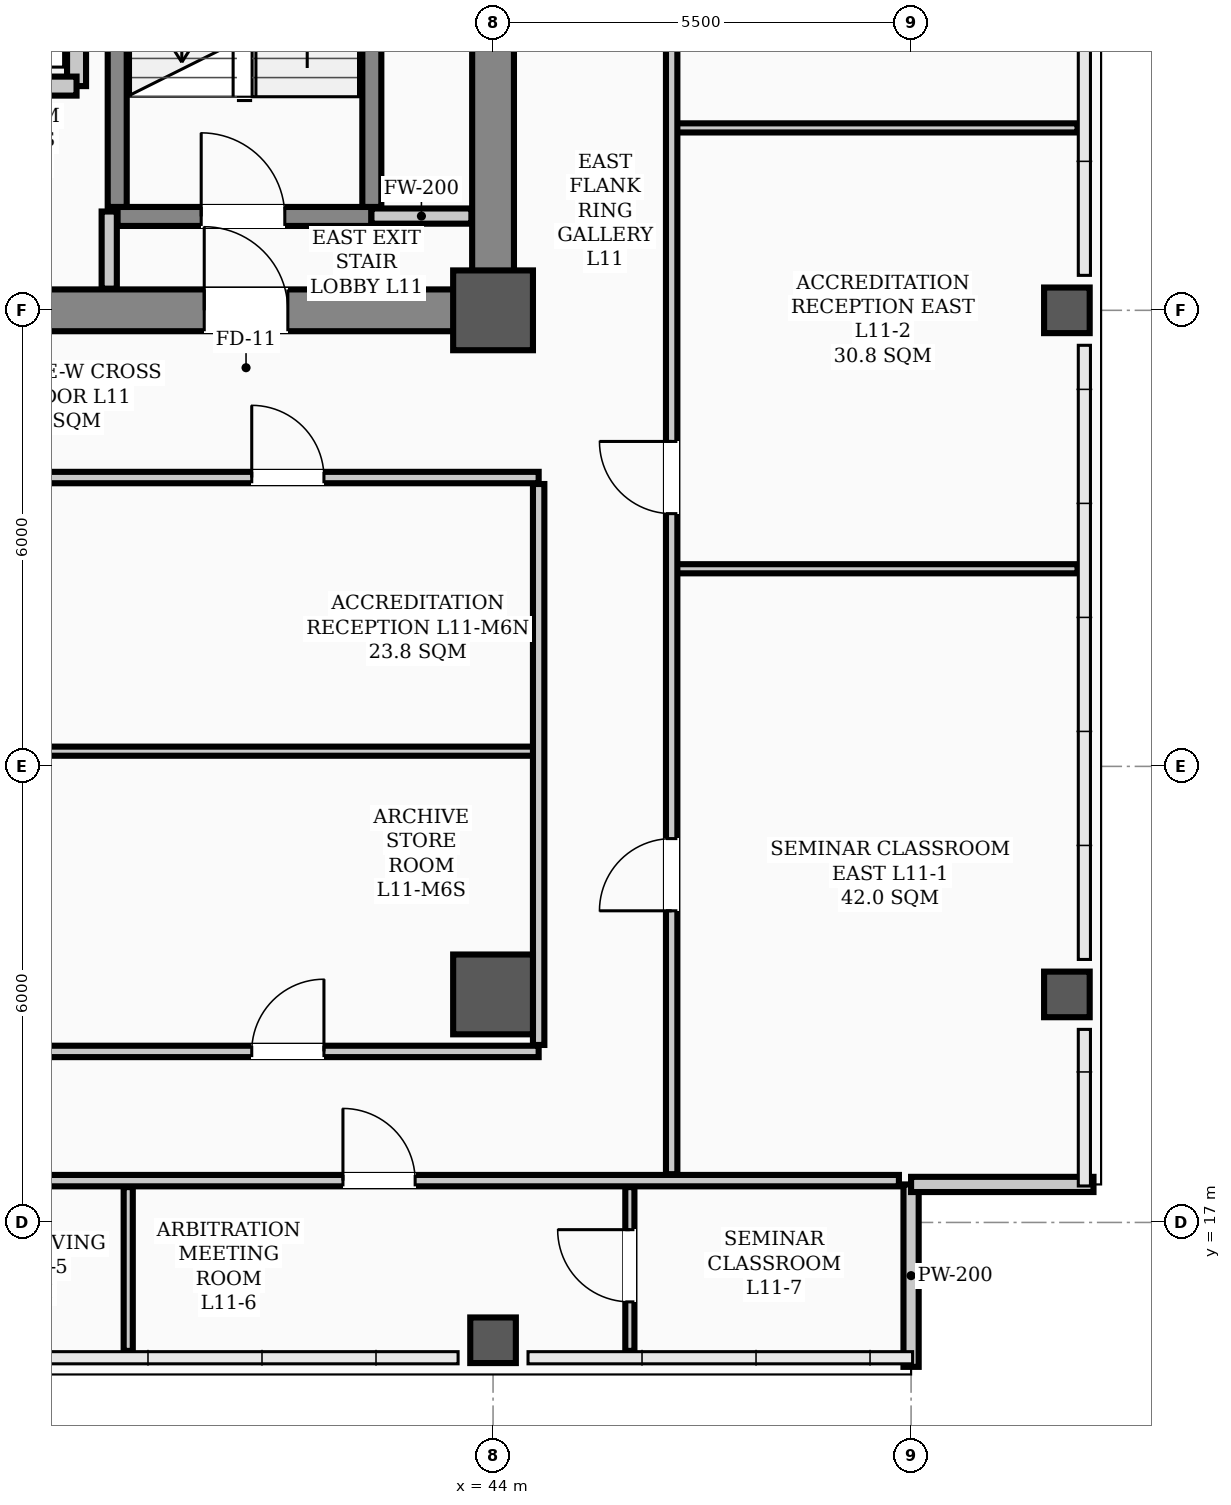
"""IFC4 building model, lengths in metres.
Left out: names, types, materials, properties, quantities, classifications, styles, units other than length and angle.
Written with IfcOpenShell. Run it as: python <this file> out.ifc"""

import sys

from ifc_helpers import new_model, si_unit, direction, frame, frame_2d, origin, origin_2d, place, context, subcontext, project, spatial, rectangle, hollow_rectangle, extrude, element, fill, save


model = new_model("IFC4")
c1 = context("Model", 3, precision=1e-05, world=origin(), true_north=direction((0.0, 1.0)))
c2 = subcontext(c1, "Body", "Model", "MODEL_VIEW")
j1 = project(units=[si_unit("LENGTHUNIT", "METRE"), si_unit("PLANEANGLEUNIT", "RADIAN")], contexts=[c1])
p1 = place(None, origin())
s1 = spatial("IfcSite", under=j1, at=p1, CompositionType="ELEMENT")
p2 = place(p1, origin())
s2 = spatial("IfcBuilding", under=s1, at=p2, CompositionType="ELEMENT")
p3 = place(p2, frame((0.0, 0.0, 46.0)))
s3 = spatial("IfcBuildingStorey", under=s2, at=p3, CompositionType="ELEMENT", Elevation=46.0)
for number, where, z_axis, x_axis in (
    (1, (44.0, 29.0, 0.0), (0.0, 0.0, 1.0), (1.0, 0.0, 0.0)),
    (2, (44.0, 20.0, 0.0), (0.0, 0.0, 1.0), (1.0, 0.0, 0.0)),
):
    element("IfcColumn", number, at=place(p3, frame(where, z_axis=z_axis, x_axis=x_axis)), inside=s3, PredefinedType="COLUMN", context=c2, shape_type="SweptSolid", body=[
        extrude(hollow_rectangle(XDim=1.05, YDim=1.05, WallThickness=0.038, InnerFilletRadius=0.019, OuterFilletRadius=0.057, at=origin_2d()), origin(), (0.0, 0.0, 1.0), 3.9),
    ])
for number, where, z_axis, x_axis in (
    (3, (44.0, 15.45, 0.0), (0.0, 0.0, 1.0), (1.0, 0.0, 0.0)),
    (4, (51.55, 20.0, 0.0), (0.0, 0.0, 1.0), (1.0, 0.0, 0.0)),
    (5, (51.55, 29.0, 0.0), (0.0, 0.0, 1.0), (1.0, 0.0, 0.0)),
):
    element("IfcColumn", number, at=place(p3, frame(where, z_axis=z_axis, x_axis=x_axis)), inside=s3, PredefinedType="COLUMN", context=c2, shape_type="SweptSolid", body=[
        extrude(hollow_rectangle(XDim=0.6, YDim=0.6, WallThickness=0.026, InnerFilletRadius=0.013, OuterFilletRadius=0.039, at=origin_2d()), origin(), (0.0, 0.0, 1.0), 3.9),
    ])
for number, where, z_axis, x_axis in (
    (6, (49.5, 15.1, 0.0), (0.0, 0.0, 1.0), (0.0, 1.0, 0.0)),
    (7, (49.5, 17.5, 0.0), (0.0, 0.0, 1.0), (1.0, 0.0, 0.0)),
):
    element("IfcWall", number, at=place(p3, frame(where, z_axis=z_axis, x_axis=x_axis)), inside=s3, PredefinedType="PARAPET", context=c2, shape_type="SweptSolid", body=[
        extrude(rectangle(XDim=2.4, YDim=0.2, at=frame_2d((1.2, 0.0))), origin(), (0.0, 0.0, 1.0), 1.2),
    ])
p4 = place(p3, frame((13.5, 29.0, 0.0), z_axis=(0.0, 0.0, 1.0), x_axis=(1.0, 0.0, 0.0)))
e8 = element("IfcWall", 8, at=p4, inside=s3, PredefinedType="SHEAR", context=c2, shape_type="SweptSolid", body=[
    extrude(rectangle(XDim=30.5, YDim=0.55, at=frame_2d((15.25, 0.0))), origin(), (0.0, 0.0, 1.0), 3.72),
])
p5 = place(p4, frame((1.75, 0.0, 0.0)))
e9 = element("IfcOpeningElement", 9, at=p5, cuts=e8, PredefinedType="OPENING", context=c2, shape_type="SweptSolid", body=[
    extrude(rectangle(XDim=1.1, YDim=2.08, at=frame_2d((0.55, 1.04))), frame((0.0, 0.285, 0.0), z_axis=(0.0, -1.0, 0.0), x_axis=(1.0, 0.0, 0.0)), (0.0, 0.0, 1.0), 0.57),
])
p6 = place(p4, frame((26.7, 0.0, 0.0)))
e10 = element("IfcOpeningElement", 10, at=p6, cuts=e8, PredefinedType="OPENING", context=c2, shape_type="SweptSolid", body=[
    extrude(rectangle(XDim=1.1, YDim=2.08, at=frame_2d((0.55, 1.04))), frame((0.0, 0.285, 0.0), z_axis=(0.0, -1.0, 0.0), x_axis=(1.0, 0.0, 0.0)), (0.0, 0.0, 1.0), 0.57),
])
p7 = place(p4, frame((6.8, 0.0, 0.0)))
e11 = element("IfcOpeningElement", 11, at=p7, cuts=e8, PredefinedType="OPENING", context=c2, shape_type="SweptSolid", body=[
    extrude(rectangle(XDim=1.1, YDim=2.08, at=frame_2d((0.55, 1.04))), frame((0.0, 0.285, 0.0), z_axis=(0.0, -1.0, 0.0), x_axis=(1.0, 0.0, 0.0)), (0.0, 0.0, 1.0), 0.57),
])
p8 = place(p4, frame((13.2, 0.0, 0.0)))
e12 = element("IfcOpeningElement", 12, at=p8, cuts=e8, PredefinedType="OPENING", context=c2, shape_type="SweptSolid", body=[
    extrude(rectangle(XDim=1.6, YDim=2.08, at=frame_2d((0.8, 1.04))), frame((0.0, 0.285, 0.0), z_axis=(0.0, -1.0, 0.0), x_axis=(1.0, 0.0, 0.0)), (0.0, 0.0, 1.0), 0.57),
])
p9 = place(p4, frame((19.6, 0.0, 0.0)))
e13 = element("IfcOpeningElement", 13, at=p9, cuts=e8, PredefinedType="OPENING", context=c2, shape_type="SweptSolid", body=[
    extrude(rectangle(XDim=0.9, YDim=2.08, at=frame_2d((0.45, 1.04))), frame((0.0, 0.285, 0.0), z_axis=(0.0, -1.0, 0.0), x_axis=(1.0, 0.0, 0.0)), (0.0, 0.0, 1.0), 0.57),
])
p10 = place(p4, frame((21.6, 0.0, 0.0)))
e14 = element("IfcOpeningElement", 14, at=p10, cuts=e8, PredefinedType="OPENING", context=c2, shape_type="SweptSolid", body=[
    extrude(rectangle(XDim=0.9, YDim=2.08, at=frame_2d((0.45, 1.04))), frame((0.0, 0.285, 0.0), z_axis=(0.0, -1.0, 0.0), x_axis=(1.0, 0.0, 0.0)), (0.0, 0.0, 1.0), 0.57),
])
p11 = place(p3, frame((44.0, 29.35, 0.0), z_axis=(0.0, 0.0, 1.0), x_axis=(0.0, 1.0, 0.0)))
e15 = element("IfcWall", 15, at=p11, inside=s3, PredefinedType="SHEAR", context=c2, shape_type="SweptSolid", body=[
    extrude(rectangle(XDim=8.6, YDim=0.55, at=frame_2d((4.3, 0.0))), origin(), (0.0, 0.0, 1.0), 3.72),
])
p12 = place(p3, frame((39.06, 30.235, 0.0), z_axis=(0.0, 0.0, 1.0), x_axis=(1.0, 0.0, 0.0)))
e16 = element("IfcWall", 16, at=p12, inside=s3, PredefinedType="STANDARD", context=c2, shape_type="SweptSolid", body=[
    extrude(rectangle(XDim=3.34, YDim=0.25, at=frame_2d((1.67, 0.0))), origin(), (0.0, 0.0, 1.0), 3.72),
])
p13 = place(p12, frame((1.1, 0.0, 0.0)))
e17 = element("IfcOpeningElement", 17, at=p13, cuts=e16, PredefinedType="OPENING", context=c2, shape_type="SweptSolid", body=[
    extrude(rectangle(XDim=1.1, YDim=2.08, at=frame_2d((0.55, 1.04))), frame((0.0, 0.135, 0.0), z_axis=(0.0, -1.0, 0.0), x_axis=(1.0, 0.0, 0.0)), (0.0, 0.0, 1.0), 0.27),
])
for number, where, z_axis, x_axis in (
    (18, (39.055, 30.36, 0.0), (0.0, 0.0, 1.0), (0.0, 1.0, 0.0)),
    (19, (42.405, 30.36, 0.0), (0.0, 0.0, 1.0), (0.0, 1.0, 0.0)),
):
    element("IfcWall", number, at=place(p3, frame(where, z_axis=z_axis, x_axis=x_axis)), inside=s3, PredefinedType="STANDARD", context=c2, shape_type="SweptSolid", body=[
        extrude(rectangle(XDim=7.184, YDim=0.25, at=frame_2d((3.592, 0.0))), origin(), (0.0, 0.0, 1.0), 3.72),
    ])
p14 = place(p3, frame((38.52, 31.95, 0.0), z_axis=(0.0, 0.0, 1.0), x_axis=(0.0, 1.0, 0.0)))
e20 = element("IfcWall", 20, at=p14, inside=s3, PredefinedType="STANDARD", context=c2, shape_type="SweptSolid", body=[
    extrude(rectangle(XDim=6.0, YDim=0.25, at=frame_2d((3.0, 0.0))), origin(), (0.0, 0.0, 1.0), 3.3),
])
p15 = place(p3, frame((36.62, 31.95, 0.0), z_axis=(0.0, 0.0, 1.0), x_axis=(1.0, 0.0, 0.0)))
e21 = element("IfcWall", 21, at=p15, inside=s3, PredefinedType="STANDARD", context=c2, shape_type="SweptSolid", body=[
    extrude(rectangle(XDim=1.9, YDim=0.25, at=frame_2d((0.95, 0.0))), origin(), (0.0, 0.0, 1.0), 3.48),
])
p16 = place(p3, frame((42.4, 30.24, 0.0), z_axis=(0.0, 0.0, 1.0), x_axis=(1.0, 0.0, 0.0)))
e22 = element("IfcWall", 22, at=p16, inside=s3, PredefinedType="STANDARD", context=c2, shape_type="SweptSolid", body=[
    extrude(rectangle(XDim=1.315, YDim=0.2, at=frame_2d((0.658, 0.0))), origin(), (0.0, 0.0, 1.0), 3.1),
])
p17 = place(p3, frame((12.9, 26.8, 0.0), z_axis=(0.0, 0.0, 1.0), x_axis=(1.0, 0.0, 0.0)))
e23 = element("IfcWall", 23, at=p17, inside=s3, PredefinedType="PARTITIONING", context=c2, shape_type="SweptSolid", body=[
    extrude(rectangle(XDim=31.7, YDim=0.15, at=frame_2d((15.85, 0.0))), origin(), (0.0, 0.0, 1.0), 3.1),
])
p18 = place(p17, frame((13.6, 0.0, 0.0)))
e24 = element("IfcOpeningElement", 24, at=p18, cuts=e23, PredefinedType="OPENING", context=c2, shape_type="SweptSolid", body=[
    extrude(rectangle(XDim=1.6, YDim=2.08, at=frame_2d((0.8, 1.04))), frame((0.0, 0.085, 0.0), z_axis=(0.0, -1.0, 0.0), x_axis=(1.0, 0.0, 0.0)), (0.0, 0.0, 1.0), 0.17),
])
p19 = place(p17, frame((2.175, 0.0, 0.0)))
e25 = element("IfcOpeningElement", 25, at=p19, cuts=e23, PredefinedType="OPENING", context=c2, shape_type="SweptSolid", body=[
    extrude(rectangle(XDim=0.95, YDim=2.08, at=frame_2d((0.475, 1.04))), frame((0.0, 0.085, 0.0), z_axis=(0.0, -1.0, 0.0), x_axis=(1.0, 0.0, 0.0)), (0.0, 0.0, 1.0), 0.17),
])
p20 = place(p17, frame((6.925, 0.0, 0.0)))
e26 = element("IfcOpeningElement", 26, at=p20, cuts=e23, PredefinedType="OPENING", context=c2, shape_type="SweptSolid", body=[
    extrude(rectangle(XDim=0.95, YDim=2.08, at=frame_2d((0.475, 1.04))), frame((0.0, 0.085, 0.0), z_axis=(0.0, -1.0, 0.0), x_axis=(1.0, 0.0, 0.0)), (0.0, 0.0, 1.0), 0.17),
])
p21 = place(p17, frame((10.925, 0.0, 0.0)))
e27 = element("IfcOpeningElement", 27, at=p21, cuts=e23, PredefinedType="OPENING", context=c2, shape_type="SweptSolid", body=[
    extrude(rectangle(XDim=0.95, YDim=2.08, at=frame_2d((0.475, 1.04))), frame((0.0, 0.085, 0.0), z_axis=(0.0, -1.0, 0.0), x_axis=(1.0, 0.0, 0.0)), (0.0, 0.0, 1.0), 0.17),
])
p22 = place(p17, frame((16.025, 0.0, 0.0)))
e28 = element("IfcOpeningElement", 28, at=p22, cuts=e23, PredefinedType="OPENING", context=c2, shape_type="SweptSolid", body=[
    extrude(rectangle(XDim=0.95, YDim=2.08, at=frame_2d((0.475, 1.04))), frame((0.0, 0.085, 0.0), z_axis=(0.0, -1.0, 0.0), x_axis=(1.0, 0.0, 0.0)), (0.0, 0.0, 1.0), 0.17),
])
p23 = place(p17, frame((21.725, 0.0, 0.0)))
e29 = element("IfcOpeningElement", 29, at=p23, cuts=e23, PredefinedType="OPENING", context=c2, shape_type="SweptSolid", body=[
    extrude(rectangle(XDim=0.95, YDim=2.08, at=frame_2d((0.475, 1.04))), frame((0.0, 0.085, 0.0), z_axis=(0.0, -1.0, 0.0), x_axis=(1.0, 0.0, 0.0)), (0.0, 0.0, 1.0), 0.17),
])
p24 = place(p17, frame((27.925, 0.0, 0.0)))
e30 = element("IfcOpeningElement", 30, at=p24, cuts=e23, PredefinedType="OPENING", context=c2, shape_type="SweptSolid", body=[
    extrude(rectangle(XDim=0.95, YDim=2.08, at=frame_2d((0.475, 1.04))), frame((0.0, 0.085, 0.0), z_axis=(0.0, -1.0, 0.0), x_axis=(1.0, 0.0, 0.0)), (0.0, 0.0, 1.0), 0.17),
])
p25 = place(p3, frame((4.66, 17.55, 0.0), z_axis=(0.0, 0.0, 1.0), x_axis=(1.0, 0.0, 0.0)))
e31 = element("IfcWall", 31, at=p25, inside=s3, PredefinedType="PARTITIONING", context=c2, shape_type="SweptSolid", body=[
    extrude(rectangle(XDim=44.68, YDim=0.15, at=frame_2d((22.34, 0.0))), origin(), (0.0, 0.0, 1.0), 3.1),
])
p26 = place(p25, frame((10.565, 0.0, 0.0)))
e32 = element("IfcOpeningElement", 32, at=p26, cuts=e31, PredefinedType="OPENING", context=c2, shape_type="SweptSolid", body=[
    extrude(rectangle(XDim=0.95, YDim=2.08, at=frame_2d((0.475, 1.04))), frame((0.0, 0.085, 0.0), z_axis=(0.0, -1.0, 0.0), x_axis=(1.0, 0.0, 0.0)), (0.0, 0.0, 1.0), 0.17),
])
p27 = place(p25, frame((16.165, 0.0, 0.0)))
e33 = element("IfcOpeningElement", 33, at=p27, cuts=e31, PredefinedType="OPENING", context=c2, shape_type="SweptSolid", body=[
    extrude(rectangle(XDim=0.95, YDim=2.08, at=frame_2d((0.475, 1.04))), frame((0.0, 0.085, 0.0), z_axis=(0.0, -1.0, 0.0), x_axis=(1.0, 0.0, 0.0)), (0.0, 0.0, 1.0), 0.17),
])
p28 = place(p25, frame((30.565, 0.0, 0.0)))
e34 = element("IfcOpeningElement", 34, at=p28, cuts=e31, PredefinedType="OPENING", context=c2, shape_type="SweptSolid", body=[
    extrude(rectangle(XDim=0.95, YDim=2.08, at=frame_2d((0.475, 1.04))), frame((0.0, 0.085, 0.0), z_axis=(0.0, -1.0, 0.0), x_axis=(1.0, 0.0, 0.0)), (0.0, 0.0, 1.0), 0.17),
])
p29 = place(p25, frame((37.365, 0.0, 0.0)))
e35 = element("IfcOpeningElement", 35, at=p29, cuts=e31, PredefinedType="OPENING", context=c2, shape_type="SweptSolid", body=[
    extrude(rectangle(XDim=0.95, YDim=2.08, at=frame_2d((0.475, 1.04))), frame((0.0, 0.085, 0.0), z_axis=(0.0, -1.0, 0.0), x_axis=(1.0, 0.0, 0.0)), (0.0, 0.0, 1.0), 0.17),
])
p30 = place(p3, frame((28.4, 19.25, 0.0), z_axis=(0.0, 0.0, 1.0), x_axis=(1.0, 0.0, 0.0)))
e36 = element("IfcWall", 36, at=p30, inside=s3, PredefinedType="PARTITIONING", context=c2, shape_type="SweptSolid", body=[
    extrude(rectangle(XDim=16.2, YDim=0.15, at=frame_2d((8.1, 0.0))), origin(), (0.0, 0.0, 1.0), 3.1),
])
p31 = place(p30, frame((0.525, 0.0, 0.0)))
e37 = element("IfcOpeningElement", 37, at=p31, cuts=e36, PredefinedType="OPENING", context=c2, shape_type="SweptSolid", body=[
    extrude(rectangle(XDim=0.95, YDim=2.08, at=frame_2d((0.475, 1.04))), frame((0.0, 0.085, 0.0), z_axis=(0.0, -1.0, 0.0), x_axis=(1.0, 0.0, 0.0)), (0.0, 0.0, 1.0), 0.17),
])
p32 = place(p30, frame((6.225, 0.0, 0.0)))
e38 = element("IfcOpeningElement", 38, at=p32, cuts=e36, PredefinedType="OPENING", context=c2, shape_type="SweptSolid", body=[
    extrude(rectangle(XDim=0.95, YDim=2.08, at=frame_2d((0.475, 1.04))), frame((0.0, 0.085, 0.0), z_axis=(0.0, -1.0, 0.0), x_axis=(1.0, 0.0, 0.0)), (0.0, 0.0, 1.0), 0.17),
])
p33 = place(p30, frame((12.425, 0.0, 0.0)))
e39 = element("IfcOpeningElement", 39, at=p33, cuts=e36, PredefinedType="OPENING", context=c2, shape_type="SweptSolid", body=[
    extrude(rectangle(XDim=0.95, YDim=2.08, at=frame_2d((0.475, 1.04))), frame((0.0, 0.085, 0.0), z_axis=(0.0, -1.0, 0.0), x_axis=(1.0, 0.0, 0.0)), (0.0, 0.0, 1.0), 0.17),
])
p34 = place(p3, frame((38.0, 23.2, 0.0), z_axis=(0.0, 0.0, 1.0), x_axis=(1.0, 0.0, 0.0)))
e40 = element("IfcWall", 40, at=p34, inside=s3, PredefinedType="PARTITIONING", context=c2, shape_type="SweptSolid", body=[
    extrude(rectangle(XDim=6.6, YDim=0.12, at=frame_2d((3.3, 0.0))), origin(), (0.0, 0.0, 1.0), 3.1),
])
for number, where, z_axis, x_axis in (
    (41, (46.35, 25.6, 0.0), (0.0, 0.0, 1.0), (1.0, 0.0, 0.0)),
    (42, (46.35, 31.4, 0.0), (0.0, 0.0, 1.0), (1.0, 0.0, 0.0)),
):
    element("IfcWall", number, at=place(p3, frame(where, z_axis=z_axis, x_axis=x_axis)), inside=s3, PredefinedType="PARTITIONING", context=c2, shape_type="SweptSolid", body=[
        extrude(rectangle(XDim=5.34, YDim=0.12, at=frame_2d((2.67, 0.0))), origin(), (0.0, 0.0, 1.0), 3.212),
    ])
p35 = place(p3, frame((38.95, 29.285, 0.0), z_axis=(0.0, 0.0, 1.0), x_axis=(0.0, 1.0, 0.0)))
e43 = element("IfcWall", 43, at=p35, inside=s3, PredefinedType="STANDARD", context=c2, shape_type="SweptSolid", body=[
    extrude(rectangle(XDim=1.015, YDim=0.2, at=frame_2d((0.508, 0.0))), origin(), (0.0, 0.0, 1.0), 3.3),
])
p36 = place(p3, frame((46.35, 17.635, 0.0), z_axis=(0.0, 0.0, 1.0), x_axis=(0.0, 1.0, 0.0)))
e44 = element("IfcWall", 44, at=p36, inside=s3, PredefinedType="PARTITIONING", context=c2, shape_type="SweptSolid", body=[
    extrude(rectangle(XDim=22.53, YDim=0.15, at=frame_2d((11.265, 0.0))), origin(), (0.0, 0.0, 1.0), 3.0),
])
p37 = place(p36, frame((3.465, 0.0, 0.0)))
e45 = element("IfcOpeningElement", 45, at=p37, cuts=e44, PredefinedType="OPENING", context=c2, shape_type="SweptSolid", body=[
    extrude(rectangle(XDim=0.95, YDim=2.08, at=frame_2d((0.475, 1.04))), frame((0.0, 0.085, 0.0), z_axis=(0.0, -1.0, 0.0), x_axis=(1.0, 0.0, 0.0)), (0.0, 0.0, 1.0), 0.17),
])
p38 = place(p36, frame((8.69, 0.0, 0.0)))
e46 = element("IfcOpeningElement", 46, at=p38, cuts=e44, PredefinedType="OPENING", context=c2, shape_type="SweptSolid", body=[
    extrude(rectangle(XDim=0.95, YDim=2.08, at=frame_2d((0.475, 1.04))), frame((0.0, 0.085, 0.0), z_axis=(0.0, -1.0, 0.0), x_axis=(1.0, 0.0, 0.0)), (0.0, 0.0, 1.0), 0.17),
])
p39 = place(p36, frame((15.69, 0.0, 0.0)))
e47 = element("IfcOpeningElement", 47, at=p39, cuts=e44, PredefinedType="OPENING", context=c2, shape_type="SweptSolid", body=[
    extrude(rectangle(XDim=0.95, YDim=2.08, at=frame_2d((0.475, 1.04))), frame((0.0, 0.085, 0.0), z_axis=(0.0, -1.0, 0.0), x_axis=(1.0, 0.0, 0.0)), (0.0, 0.0, 1.0), 0.17),
])
p40 = place(p36, frame((20.115, 0.0, 0.0)))
e48 = element("IfcOpeningElement", 48, at=p40, cuts=e44, PredefinedType="OPENING", context=c2, shape_type="SweptSolid", body=[
    extrude(rectangle(XDim=0.95, YDim=2.08, at=frame_2d((0.475, 1.04))), frame((0.0, 0.085, 0.0), z_axis=(0.0, -1.0, 0.0), x_axis=(1.0, 0.0, 0.0)), (0.0, 0.0, 1.0), 0.17),
])
p41 = place(p3, frame((44.6, 19.335, 0.0), z_axis=(0.0, 0.0, 1.0), x_axis=(0.0, 1.0, 0.0)))
e49 = element("IfcWall", 49, at=p41, inside=s3, PredefinedType="PARTITIONING", context=c2, shape_type="SweptSolid", body=[
    extrude(rectangle(XDim=7.38, YDim=0.15, at=frame_2d((3.69, 0.0))), origin(), (0.0, 0.0, 1.0), 3.0),
])
p42 = place(p3, frame((39.2, 15.31, 0.0), z_axis=(0.0, 0.0, 1.0), x_axis=(0.0, 1.0, 0.0)))
e50 = element("IfcWall", 50, at=p42, inside=s3, PredefinedType="PARTITIONING", context=c2, shape_type="SweptSolid", body=[
    extrude(rectangle(XDim=2.155, YDim=0.12, at=frame_2d((1.078, 0.0))), origin(), (0.0, 0.0, 1.0), 3.212),
])
p43 = place(p3, frame((45.8, 15.31, 0.0), z_axis=(0.0, 0.0, 1.0), x_axis=(0.0, 1.0, 0.0)))
e51 = element("IfcWall", 51, at=p43, inside=s3, PredefinedType="PARTITIONING", context=c2, shape_type="SweptSolid", body=[
    extrude(rectangle(XDim=2.155, YDim=0.12, at=frame_2d((1.078, 0.0))), origin(), (0.0, 0.0, 1.0), 3.72),
])
p44 = place(p43, frame((0.645, 0.0, 0.0)))
e52 = element("IfcOpeningElement", 52, at=p44, cuts=e51, PredefinedType="OPENING", context=c2, shape_type="SweptSolid", body=[
    extrude(rectangle(XDim=0.95, YDim=2.08, at=frame_2d((0.475, 1.04))), frame((0.0, 0.07, 0.0), z_axis=(0.0, -1.0, 0.0), x_axis=(1.0, 0.0, 0.0)), (0.0, 0.0, 1.0), 0.14),
])
p45 = place(p13, origin())
e53 = element("IfcDoor", 53, at=p45, inside=s3, OperationType="SINGLE_SWING_LEFT", PredefinedType="DOOR", context=c2, shape_type="SweptSolid", body=[
    extrude(rectangle(XDim=1.1, YDim=2.08, at=frame_2d((0.55, 1.04))), frame((0.0, 0.025, 0.0), z_axis=(0.0, -1.0, 0.0), x_axis=(1.0, 0.0, 0.0)), (0.0, 0.0, 1.0), 0.05),
])
fill(e17, e53)
p46 = place(p6, origin())
e54 = element("IfcDoor", 54, at=p46, inside=s3, OperationType="SINGLE_SWING_LEFT", PredefinedType="DOOR", context=c2, shape_type="SweptSolid", body=[
    extrude(rectangle(XDim=1.1, YDim=2.08, at=frame_2d((0.55, 1.04))), frame((0.0, 0.025, 0.0), z_axis=(0.0, -1.0, 0.0), x_axis=(1.0, 0.0, 0.0)), (0.0, 0.0, 1.0), 0.05),
])
fill(e10, e54)
p47 = place(p29, origin())
e55 = element("IfcDoor", 55, at=p47, inside=s3, OperationType="SINGLE_SWING_LEFT", PredefinedType="DOOR", context=c2, shape_type="SweptSolid", body=[
    extrude(rectangle(XDim=0.95, YDim=2.08, at=frame_2d((0.475, 1.04))), frame((0.0, 0.025, 0.0), z_axis=(0.0, -1.0, 0.0), x_axis=(1.0, 0.0, 0.0)), (0.0, 0.0, 1.0), 0.05),
])
fill(e35, e55)
p48 = place(p44, origin())
e56 = element("IfcDoor", 56, at=p48, inside=s3, OperationType="SINGLE_SWING_RIGHT", PredefinedType="DOOR", context=c2, shape_type="SweptSolid", body=[
    extrude(rectangle(XDim=0.95, YDim=2.08, at=frame_2d((0.475, 1.04))), frame((0.0, 0.025, 0.0), z_axis=(0.0, -1.0, 0.0), x_axis=(1.0, 0.0, 0.0)), (0.0, 0.0, 1.0), 0.05),
])
fill(e52, e56)
p49 = place(p24, origin())
e57 = element("IfcDoor", 57, at=p49, inside=s3, OperationType="SINGLE_SWING_LEFT", PredefinedType="DOOR", context=c2, shape_type="SweptSolid", body=[
    extrude(rectangle(XDim=0.95, YDim=2.08, at=frame_2d((0.475, 1.04))), frame((0.0, 0.025, 0.0), z_axis=(0.0, -1.0, 0.0), x_axis=(1.0, 0.0, 0.0)), (0.0, 0.0, 1.0), 0.05),
])
fill(e30, e57)
p50 = place(p33, origin())
e58 = element("IfcDoor", 58, at=p50, inside=s3, OperationType="SINGLE_SWING_RIGHT", PredefinedType="DOOR", context=c2, shape_type="SweptSolid", body=[
    extrude(rectangle(XDim=0.95, YDim=2.08, at=frame_2d((0.475, 1.04))), frame((0.0, 0.025, 0.0), z_axis=(0.0, -1.0, 0.0), x_axis=(1.0, 0.0, 0.0)), (0.0, 0.0, 1.0), 0.05),
])
fill(e39, e58)
p51 = place(p37, origin())
e59 = element("IfcDoor", 59, at=p51, inside=s3, OperationType="SINGLE_SWING_LEFT", PredefinedType="DOOR", context=c2, shape_type="SweptSolid", body=[
    extrude(rectangle(XDim=0.95, YDim=2.08, at=frame_2d((0.475, 1.04))), frame((0.0, 0.025, 0.0), z_axis=(0.0, -1.0, 0.0), x_axis=(1.0, 0.0, 0.0)), (0.0, 0.0, 1.0), 0.05),
])
fill(e45, e59)
p52 = place(p38, origin())
e60 = element("IfcDoor", 60, at=p52, inside=s3, OperationType="SINGLE_SWING_RIGHT", PredefinedType="DOOR", context=c2, shape_type="SweptSolid", body=[
    extrude(rectangle(XDim=0.95, YDim=2.08, at=frame_2d((0.475, 1.04))), frame((0.0, 0.025, 0.0), z_axis=(0.0, -1.0, 0.0), x_axis=(1.0, 0.0, 0.0)), (0.0, 0.0, 1.0), 0.05),
])
fill(e46, e60)
save(model, sys.argv[1])
